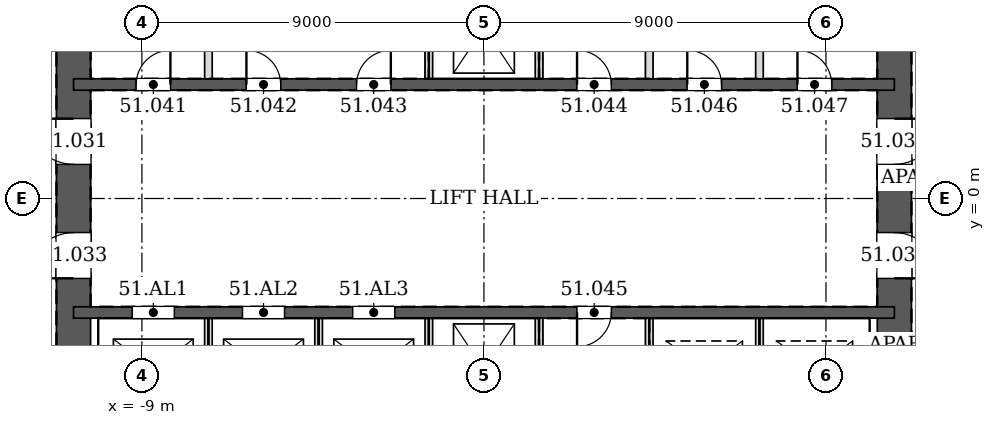
"""IFC4 building model, lengths in metres.
Left out: names, types, materials, properties, quantities, classifications, styles, units other than length and angle.
Written with IfcOpenShell. Run it as: python <this file> out.ifc"""

import sys

from ifc_helpers import new_model, si_unit, direction, frame, frame_2d, origin, place, context, subcontext, project, spatial, rectangle, extrude, element, fill, save


model = new_model("IFC4")
c1 = context("Model", 3, precision=1e-05, world=origin(), true_north=direction((0.0, 1.0)))
c2 = subcontext(c1, "Body", "Model", "MODEL_VIEW")
j1 = project(units=[si_unit("LENGTHUNIT", "METRE"), si_unit("PLANEANGLEUNIT", "RADIAN")], contexts=[c1])
p1 = place(None, origin())
s1 = spatial("IfcSite", under=j1, at=p1, CompositionType="ELEMENT")
p2 = place(p1, origin())
s2 = spatial("IfcBuilding", under=s1, at=p2, CompositionType="ELEMENT")
p3 = place(p2, frame((0.0, 0.0, 221.0)))
s3 = spatial("IfcBuildingStorey", under=s2, at=p3, CompositionType="ELEMENT", Elevation=221.0)
p4 = place(p3, frame((10.8, -10.8, 0.0), z_axis=(0.0, 0.0, 1.0), x_axis=(0.0, 1.0, 0.0)))
e1 = element("IfcWall", 1, at=p4, inside=s3, PredefinedType="SOLIDWALL", context=c2, shape_type="SweptSolid", body=[
    extrude(rectangle(XDim=21.6, YDim=0.9, at=frame_2d((10.8, 0.0))), origin(), (0.0, 0.0, 1.0), 3.4),
])
p5 = place(p4, frame((11.7, 0.0, 0.0)))
e2 = element("IfcOpeningElement", 2, at=p5, cuts=e1, PredefinedType="OPENING", context=c2, shape_type="SweptSolid", body=[
    extrude(rectangle(XDim=1.2, YDim=2.1, at=frame_2d((0.6, 1.05))), frame((0.0, 0.46, 0.0), z_axis=(0.0, -1.0, 0.0), x_axis=(1.0, 0.0, 0.0)), (0.0, 0.0, 1.0), 0.92),
])
p6 = place(p4, frame((8.7, 0.0, 0.0)))
e3 = element("IfcOpeningElement", 3, at=p6, cuts=e1, PredefinedType="OPENING", context=c2, shape_type="SweptSolid", body=[
    extrude(rectangle(XDim=1.2, YDim=2.1, at=frame_2d((0.6, 1.05))), frame((0.0, 0.46, 0.0), z_axis=(0.0, -1.0, 0.0), x_axis=(1.0, 0.0, 0.0)), (0.0, 0.0, 1.0), 0.92),
])
p7 = place(p3, frame((-10.8, 10.8, 0.0), z_axis=(0.0, 0.0, 1.0), x_axis=(0.0, -1.0, 0.0)))
e4 = element("IfcWall", 4, at=p7, inside=s3, PredefinedType="SOLIDWALL", context=c2, shape_type="SweptSolid", body=[
    extrude(rectangle(XDim=21.6, YDim=0.9, at=frame_2d((10.8, 0.0))), origin(), (0.0, 0.0, 1.0), 3.4),
])
p8 = place(p7, frame((8.7, 0.0, 0.0)))
e5 = element("IfcOpeningElement", 5, at=p8, cuts=e4, PredefinedType="OPENING", context=c2, shape_type="SweptSolid", body=[
    extrude(rectangle(XDim=1.2, YDim=2.1, at=frame_2d((0.6, 1.05))), frame((0.0, 0.46, 0.0), z_axis=(0.0, -1.0, 0.0), x_axis=(1.0, 0.0, 0.0)), (0.0, 0.0, 1.0), 0.92),
])
p9 = place(p7, frame((11.7, 0.0, 0.0)))
e6 = element("IfcOpeningElement", 6, at=p9, cuts=e4, PredefinedType="OPENING", context=c2, shape_type="SweptSolid", body=[
    extrude(rectangle(XDim=1.2, YDim=2.1, at=frame_2d((0.6, 1.05))), frame((0.0, 0.46, 0.0), z_axis=(0.0, -1.0, 0.0), x_axis=(1.0, 0.0, 0.0)), (0.0, 0.0, 1.0), 0.92),
])
p10 = place(p3, frame((-10.8, 3.0, 0.0), z_axis=(0.0, 0.0, 1.0), x_axis=(1.0, 0.0, 0.0)))
e7 = element("IfcWall", 7, at=p10, inside=s3, PredefinedType="SOLIDWALL", context=c2, shape_type="SweptSolid", body=[
    extrude(rectangle(XDim=21.6, YDim=0.3, at=frame_2d((10.8, 0.0))), origin(), (0.0, 0.0, 1.0), 3.4),
])
p11 = place(p10, frame((1.65, 0.0, 0.0)))
e8 = element("IfcOpeningElement", 8, at=p11, cuts=e7, PredefinedType="OPENING", context=c2, shape_type="SweptSolid", body=[
    extrude(rectangle(XDim=0.9, YDim=2.1, at=frame_2d((0.45, 1.05))), frame((0.0, 0.16, 0.0), z_axis=(0.0, -1.0, 0.0), x_axis=(1.0, 0.0, 0.0)), (0.0, 0.0, 1.0), 0.32),
])
p12 = place(p10, frame((4.55, 0.0, 0.0)))
e9 = element("IfcOpeningElement", 9, at=p12, cuts=e7, PredefinedType="OPENING", context=c2, shape_type="SweptSolid", body=[
    extrude(rectangle(XDim=0.9, YDim=2.1, at=frame_2d((0.45, 1.05))), frame((0.0, 0.16, 0.0), z_axis=(0.0, -1.0, 0.0), x_axis=(1.0, 0.0, 0.0)), (0.0, 0.0, 1.0), 0.32),
])
p13 = place(p10, frame((7.45, 0.0, 0.0)))
e10 = element("IfcOpeningElement", 10, at=p13, cuts=e7, PredefinedType="OPENING", context=c2, shape_type="SweptSolid", body=[
    extrude(rectangle(XDim=0.9, YDim=2.1, at=frame_2d((0.45, 1.05))), frame((0.0, 0.16, 0.0), z_axis=(0.0, -1.0, 0.0), x_axis=(1.0, 0.0, 0.0)), (0.0, 0.0, 1.0), 0.32),
])
p14 = place(p10, frame((13.25, 0.0, 0.0)))
e11 = element("IfcOpeningElement", 11, at=p14, cuts=e7, PredefinedType="OPENING", context=c2, shape_type="SweptSolid", body=[
    extrude(rectangle(XDim=0.9, YDim=2.1, at=frame_2d((0.45, 1.05))), frame((0.0, 0.16, 0.0), z_axis=(0.0, -1.0, 0.0), x_axis=(1.0, 0.0, 0.0)), (0.0, 0.0, 1.0), 0.32),
])
p15 = place(p10, frame((16.15, 0.0, 0.0)))
e12 = element("IfcOpeningElement", 12, at=p15, cuts=e7, PredefinedType="OPENING", context=c2, shape_type="SweptSolid", body=[
    extrude(rectangle(XDim=0.9, YDim=2.1, at=frame_2d((0.45, 1.05))), frame((0.0, 0.16, 0.0), z_axis=(0.0, -1.0, 0.0), x_axis=(1.0, 0.0, 0.0)), (0.0, 0.0, 1.0), 0.32),
])
p16 = place(p10, frame((19.05, 0.0, 0.0)))
e13 = element("IfcOpeningElement", 13, at=p16, cuts=e7, PredefinedType="OPENING", context=c2, shape_type="SweptSolid", body=[
    extrude(rectangle(XDim=0.9, YDim=2.1, at=frame_2d((0.45, 1.05))), frame((0.0, 0.16, 0.0), z_axis=(0.0, -1.0, 0.0), x_axis=(1.0, 0.0, 0.0)), (0.0, 0.0, 1.0), 0.32),
])
p17 = place(p3, frame((-10.8, -3.0, 0.0), z_axis=(0.0, 0.0, 1.0), x_axis=(1.0, 0.0, 0.0)))
e14 = element("IfcWall", 14, at=p17, inside=s3, PredefinedType="SOLIDWALL", context=c2, shape_type="SweptSolid", body=[
    extrude(rectangle(XDim=21.6, YDim=0.3, at=frame_2d((10.8, 0.0))), origin(), (0.0, 0.0, 1.0), 3.4),
])
p18 = place(p17, frame((13.25, 0.0, 0.0)))
e15 = element("IfcOpeningElement", 15, at=p18, cuts=e14, PredefinedType="OPENING", context=c2, shape_type="SweptSolid", body=[
    extrude(rectangle(XDim=0.9, YDim=2.1, at=frame_2d((0.45, 1.05))), frame((0.0, 0.16, 0.0), z_axis=(0.0, -1.0, 0.0), x_axis=(1.0, 0.0, 0.0)), (0.0, 0.0, 1.0), 0.32),
])
p19 = place(p17, frame((1.55, 0.0, 0.0)))
e16 = element("IfcOpeningElement", 16, at=p19, cuts=e14, PredefinedType="OPENING", context=c2, shape_type="SweptSolid", body=[
    extrude(rectangle(XDim=1.1, YDim=2.1, at=frame_2d((0.55, 1.05))), frame((0.0, 0.16, 0.0), z_axis=(0.0, -1.0, 0.0), x_axis=(1.0, 0.0, 0.0)), (0.0, 0.0, 1.0), 0.32),
])
p20 = place(p17, frame((4.45, 0.0, 0.0)))
e17 = element("IfcOpeningElement", 17, at=p20, cuts=e14, PredefinedType="OPENING", context=c2, shape_type="SweptSolid", body=[
    extrude(rectangle(XDim=1.1, YDim=2.1, at=frame_2d((0.55, 1.05))), frame((0.0, 0.16, 0.0), z_axis=(0.0, -1.0, 0.0), x_axis=(1.0, 0.0, 0.0)), (0.0, 0.0, 1.0), 0.32),
])
p21 = place(p17, frame((7.35, 0.0, 0.0)))
e18 = element("IfcOpeningElement", 18, at=p21, cuts=e14, PredefinedType="OPENING", context=c2, shape_type="SweptSolid", body=[
    extrude(rectangle(XDim=1.1, YDim=2.1, at=frame_2d((0.55, 1.05))), frame((0.0, 0.16, 0.0), z_axis=(0.0, -1.0, 0.0), x_axis=(1.0, 0.0, 0.0)), (0.0, 0.0, 1.0), 0.32),
])
for number, where, z_axis, x_axis in (
    (19, (-7.25, 3.15, 0.0), (0.0, 0.0, 1.0), (0.0, 1.0, 0.0)),
    (20, (-1.45, 3.15, 0.0), (0.0, 0.0, 1.0), (0.0, 1.0, 0.0)),
    (21, (1.45, 3.15, 0.0), (0.0, 0.0, 1.0), (0.0, 1.0, 0.0)),
    (22, (4.35, 3.15, 0.0), (0.0, 0.0, 1.0), (0.0, 1.0, 0.0)),
    (23, (7.25, 3.15, 0.0), (0.0, 0.0, 1.0), (0.0, 1.0, 0.0)),
):
    element("IfcWall", number, at=place(p3, frame(where, z_axis=z_axis, x_axis=x_axis)), inside=s3, PredefinedType="PARTITIONING", context=c2, shape_type="SweptSolid", body=[
        extrude(rectangle(XDim=2.7, YDim=0.2, at=frame_2d((1.35, 0.0))), origin(), (0.0, 0.0, 1.0), 3.2),
    ])
for number, where, z_axis, x_axis in (
    (24, (-7.25, -5.85, 0.0), (0.0, 0.0, 1.0), (0.0, 1.0, 0.0)),
    (25, (-4.35, -5.85, 0.0), (0.0, 0.0, 1.0), (0.0, 1.0, 0.0)),
    (26, (-1.45, -5.85, 0.0), (0.0, 0.0, 1.0), (0.0, 1.0, 0.0)),
):
    element("IfcWall", number, at=place(p3, frame(where, z_axis=z_axis, x_axis=x_axis)), inside=s3, PredefinedType="PARTITIONING", context=c2, shape_type="SweptSolid", body=[
        extrude(rectangle(XDim=2.7, YDim=0.2, at=frame_2d((1.35, 0.0))), origin(), (0.0, 0.0, 1.0), 3.4),
    ])
for number, where, z_axis, x_axis in (
    (27, (1.45, -5.85, 0.0), (0.0, 0.0, 1.0), (0.0, 1.0, 0.0)),
    (28, (4.35, -5.85, 0.0), (0.0, 0.0, 1.0), (0.0, 1.0, 0.0)),
):
    element("IfcWall", number, at=place(p3, frame(where, z_axis=z_axis, x_axis=x_axis)), inside=s3, PredefinedType="PARTITIONING", context=c2, shape_type="SweptSolid", body=[
        extrude(rectangle(XDim=2.7, YDim=0.2, at=frame_2d((1.35, 0.0))), origin(), (0.0, 0.0, 1.0), 3.2),
    ])
p22 = place(p3, frame((7.25, -5.85, 0.0), z_axis=(0.0, 0.0, 1.0), x_axis=(0.0, 1.0, 0.0)))
e29 = element("IfcWall", 29, at=p22, inside=s3, PredefinedType="PARTITIONING", context=c2, shape_type="SweptSolid", body=[
    extrude(rectangle(XDim=2.7, YDim=0.2, at=frame_2d((1.35, 0.0))), origin(), (0.0, 0.0, 1.0), 3.4),
])
p23 = place(p5, frame((1.2, 0.0, 0.0), z_axis=(0.0, 0.0, 1.0), x_axis=(-1.0, 0.0, 0.0)))
e30 = element("IfcDoor", 30, at=p23, inside=s3, OperationType="SINGLE_SWING_LEFT", PredefinedType="DOOR", context=c2, shape_type="SweptSolid", body=[
    extrude(rectangle(XDim=1.2, YDim=2.1, at=frame_2d((0.6, 1.05))), frame((0.0, 0.025, 0.0), z_axis=(0.0, -1.0, 0.0), x_axis=(1.0, 0.0, 0.0)), (0.0, 0.0, 1.0), 0.05),
])
fill(e2, e30)
p24 = place(p8, frame((1.2, 0.0, 0.0), z_axis=(0.0, 0.0, 1.0), x_axis=(-1.0, 0.0, 0.0)))
e31 = element("IfcDoor", 31, at=p24, inside=s3, OperationType="SINGLE_SWING_RIGHT", PredefinedType="DOOR", context=c2, shape_type="SweptSolid", body=[
    extrude(rectangle(XDim=1.2, YDim=2.1, at=frame_2d((0.6, 1.05))), frame((0.0, 0.025, 0.0), z_axis=(0.0, -1.0, 0.0), x_axis=(1.0, 0.0, 0.0)), (0.0, 0.0, 1.0), 0.05),
])
fill(e5, e31)
p25 = place(p6, frame((1.2, 0.0, 0.0), z_axis=(0.0, 0.0, 1.0), x_axis=(-1.0, 0.0, 0.0)))
e32 = element("IfcDoor", 32, at=p25, inside=s3, OperationType="SINGLE_SWING_RIGHT", PredefinedType="DOOR", context=c2, shape_type="SweptSolid", body=[
    extrude(rectangle(XDim=1.2, YDim=2.1, at=frame_2d((0.6, 1.05))), frame((0.0, 0.025, 0.0), z_axis=(0.0, -1.0, 0.0), x_axis=(1.0, 0.0, 0.0)), (0.0, 0.0, 1.0), 0.05),
])
fill(e3, e32)
p26 = place(p9, frame((1.2, 0.0, 0.0), z_axis=(0.0, 0.0, 1.0), x_axis=(-1.0, 0.0, 0.0)))
e33 = element("IfcDoor", 33, at=p26, inside=s3, OperationType="SINGLE_SWING_LEFT", PredefinedType="DOOR", context=c2, shape_type="SweptSolid", body=[
    extrude(rectangle(XDim=1.2, YDim=2.1, at=frame_2d((0.6, 1.05))), frame((0.0, 0.025, 0.0), z_axis=(0.0, -1.0, 0.0), x_axis=(1.0, 0.0, 0.0)), (0.0, 0.0, 1.0), 0.05),
])
fill(e6, e33)
p27 = place(p11, origin())
e34 = element("IfcDoor", 34, at=p27, inside=s3, OperationType="SINGLE_SWING_RIGHT", PredefinedType="DOOR", context=c2, shape_type="SweptSolid", body=[
    extrude(rectangle(XDim=0.9, YDim=2.1, at=frame_2d((0.45, 1.05))), frame((0.0, 0.025, 0.0), z_axis=(0.0, -1.0, 0.0), x_axis=(1.0, 0.0, 0.0)), (0.0, 0.0, 1.0), 0.05),
])
fill(e8, e34)
p28 = place(p12, origin())
e35 = element("IfcDoor", 35, at=p28, inside=s3, OperationType="SINGLE_SWING_LEFT", PredefinedType="DOOR", context=c2, shape_type="SweptSolid", body=[
    extrude(rectangle(XDim=0.9, YDim=2.1, at=frame_2d((0.45, 1.05))), frame((0.0, 0.025, 0.0), z_axis=(0.0, -1.0, 0.0), x_axis=(1.0, 0.0, 0.0)), (0.0, 0.0, 1.0), 0.05),
])
fill(e9, e35)
p29 = place(p13, origin())
e36 = element("IfcDoor", 36, at=p29, inside=s3, OperationType="SINGLE_SWING_RIGHT", PredefinedType="DOOR", context=c2, shape_type="SweptSolid", body=[
    extrude(rectangle(XDim=0.9, YDim=2.1, at=frame_2d((0.45, 1.05))), frame((0.0, 0.025, 0.0), z_axis=(0.0, -1.0, 0.0), x_axis=(1.0, 0.0, 0.0)), (0.0, 0.0, 1.0), 0.05),
])
fill(e10, e36)
p30 = place(p14, origin())
e37 = element("IfcDoor", 37, at=p30, inside=s3, OperationType="SINGLE_SWING_LEFT", PredefinedType="DOOR", context=c2, shape_type="SweptSolid", body=[
    extrude(rectangle(XDim=0.9, YDim=2.1, at=frame_2d((0.45, 1.05))), frame((0.0, 0.025, 0.0), z_axis=(0.0, -1.0, 0.0), x_axis=(1.0, 0.0, 0.0)), (0.0, 0.0, 1.0), 0.05),
])
fill(e11, e37)
p31 = place(p18, frame((0.9, 0.0, 0.0), z_axis=(0.0, 0.0, 1.0), x_axis=(-1.0, 0.0, 0.0)))
e38 = element("IfcDoor", 38, at=p31, inside=s3, OperationType="SINGLE_SWING_RIGHT", PredefinedType="DOOR", context=c2, shape_type="SweptSolid", body=[
    extrude(rectangle(XDim=0.9, YDim=2.1, at=frame_2d((0.45, 1.05))), frame((0.0, 0.025, 0.0), z_axis=(0.0, -1.0, 0.0), x_axis=(1.0, 0.0, 0.0)), (0.0, 0.0, 1.0), 0.05),
])
fill(e15, e38)
p32 = place(p15, origin())
e39 = element("IfcDoor", 39, at=p32, inside=s3, OperationType="SINGLE_SWING_LEFT", PredefinedType="DOOR", context=c2, shape_type="SweptSolid", body=[
    extrude(rectangle(XDim=0.9, YDim=2.1, at=frame_2d((0.45, 1.05))), frame((0.0, 0.025, 0.0), z_axis=(0.0, -1.0, 0.0), x_axis=(1.0, 0.0, 0.0)), (0.0, 0.0, 1.0), 0.05),
])
fill(e12, e39)
p33 = place(p16, origin())
e40 = element("IfcDoor", 40, at=p33, inside=s3, OperationType="SINGLE_SWING_LEFT", PredefinedType="DOOR", context=c2, shape_type="SweptSolid", body=[
    extrude(rectangle(XDim=0.9, YDim=2.1, at=frame_2d((0.45, 1.05))), frame((0.0, 0.025, 0.0), z_axis=(0.0, -1.0, 0.0), x_axis=(1.0, 0.0, 0.0)), (0.0, 0.0, 1.0), 0.05),
])
fill(e13, e40)
p34 = place(p19, origin())
e41 = element("IfcDoor", 41, at=p34, inside=s3, OperationType="DOUBLE_DOOR_SLIDING", PredefinedType="DOOR", context=c2, shape_type="SweptSolid", body=[
    extrude(rectangle(XDim=1.1, YDim=2.1, at=frame_2d((0.55, 1.05))), frame((0.0, 0.025, 0.0), z_axis=(0.0, -1.0, 0.0), x_axis=(1.0, 0.0, 0.0)), (0.0, 0.0, 1.0), 0.05),
])
fill(e16, e41)
p35 = place(p20, origin())
e42 = element("IfcDoor", 42, at=p35, inside=s3, OperationType="DOUBLE_DOOR_SLIDING", PredefinedType="DOOR", context=c2, shape_type="SweptSolid", body=[
    extrude(rectangle(XDim=1.1, YDim=2.1, at=frame_2d((0.55, 1.05))), frame((0.0, 0.025, 0.0), z_axis=(0.0, -1.0, 0.0), x_axis=(1.0, 0.0, 0.0)), (0.0, 0.0, 1.0), 0.05),
])
fill(e17, e42)
p36 = place(p21, origin())
e43 = element("IfcDoor", 43, at=p36, inside=s3, OperationType="DOUBLE_DOOR_SLIDING", PredefinedType="DOOR", context=c2, shape_type="SweptSolid", body=[
    extrude(rectangle(XDim=1.1, YDim=2.1, at=frame_2d((0.55, 1.05))), frame((0.0, 0.025, 0.0), z_axis=(0.0, -1.0, 0.0), x_axis=(1.0, 0.0, 0.0)), (0.0, 0.0, 1.0), 0.05),
])
fill(e18, e43)
save(model, sys.argv[1])
